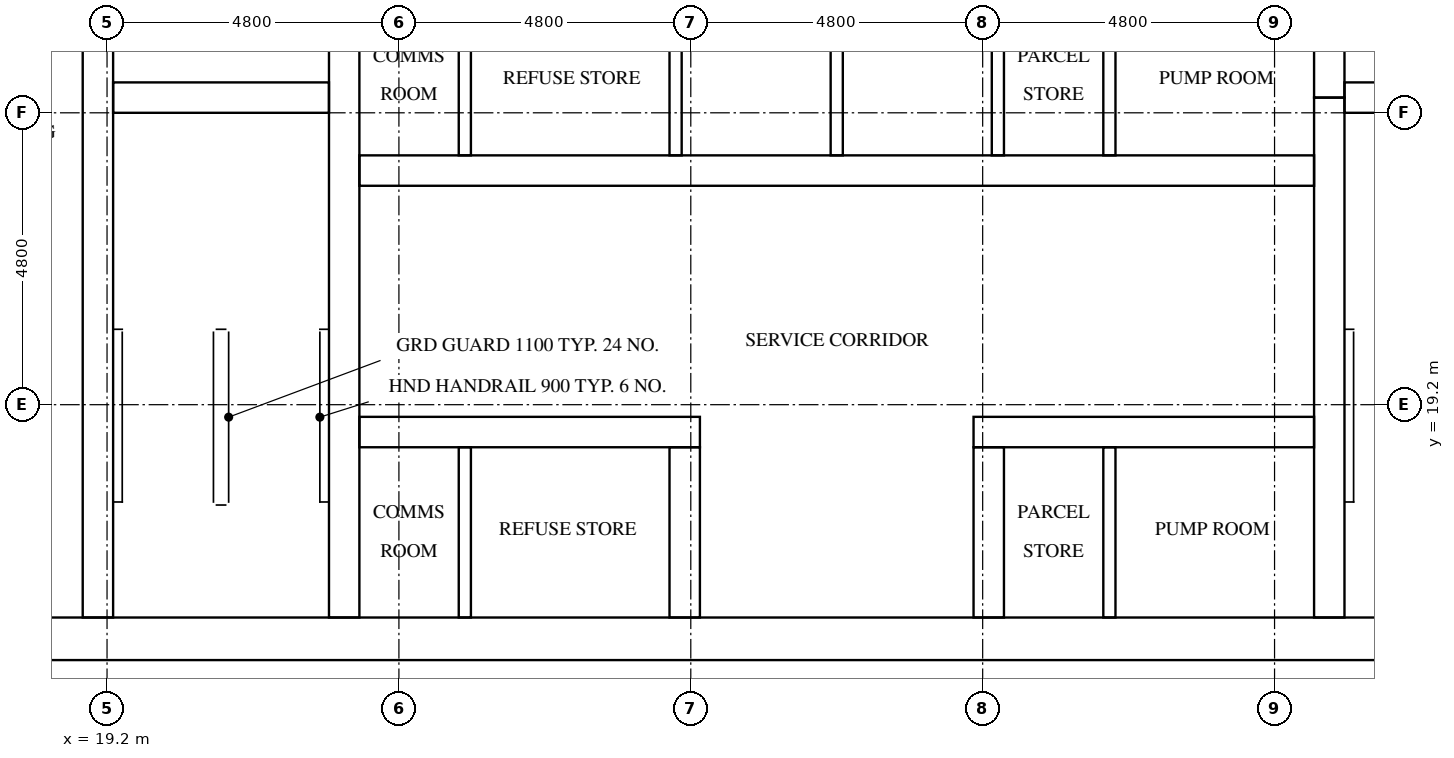
"""IFC4 building model, lengths in metres.
Left out: names, types, materials, properties, quantities, classifications, styles, units other than length and angle.
Written with IfcOpenShell. Run it as: python <this file> out.ifc"""

import sys

from ifc_helpers import new_model, si_unit, direction, frame, frame_2d, origin, place, context, subcontext, project, spatial, rectangle, extrude, element, fill, save


model = new_model("IFC4")
c1 = context("Model", 3, precision=1e-05, world=origin(), true_north=direction((0.0, 1.0)))
c2 = subcontext(c1, "Body", "Model", "MODEL_VIEW")
j1 = project(units=[si_unit("LENGTHUNIT", "METRE"), si_unit("PLANEANGLEUNIT", "RADIAN")], contexts=[c1])
p1 = place(None, origin())
s1 = spatial("IfcSite", under=j1, at=p1, CompositionType="ELEMENT")
p2 = place(p1, origin())
s2 = spatial("IfcBuilding", under=s1, at=p2, CompositionType="ELEMENT")
p3 = place(p2, frame((0.0, 0.0, 222.8)))
s3 = spatial("IfcBuildingStorey", under=s2, at=p3, CompositionType="ELEMENT", Elevation=222.8)
p4 = place(p3, frame((15.0, 15.35, 0.0), z_axis=(0.0, 0.0, 1.0), x_axis=(1.0, 0.0, 0.0)))
e1 = element("IfcWall", 1, at=p4, inside=s3, PredefinedType="SHEAR", context=c2, shape_type="SweptSolid", body=[
    extrude(rectangle(XDim=32.4, YDim=0.7, at=frame_2d((16.2, 0.0))), origin(), (0.0, 0.0, 1.0), 3.2),
])
p5 = place(p4, frame((15.3, 0.0, 0.0)))
e2 = element("IfcOpeningElement", 2, at=p5, cuts=e1, PredefinedType="OPENING", context=c2, shape_type="SweptSolid", body=[
    extrude(rectangle(XDim=1.8, YDim=2.1, at=frame_2d((0.9, 1.05))), frame((0.0, 0.36, 0.0), z_axis=(0.0, -1.0, 0.0), x_axis=(1.0, 0.0, 0.0)), (0.0, 0.0, 1.0), 0.72),
])
p6 = place(p3, frame((19.05, 15.7, 0.0), z_axis=(0.0, 0.0, 1.0), x_axis=(0.0, 1.0, 0.0)))
e3 = element("IfcWall", 3, at=p6, inside=s3, PredefinedType="SHEAR", context=c2, shape_type="SweptSolid", body=[
    extrude(rectangle(XDim=15.3, YDim=0.5, at=frame_2d((7.65, 0.0))), origin(), (0.0, 0.0, 1.0), 3.2),
])
p7 = place(p6, frame((9.75, 0.0, 0.0)))
e4 = element("IfcOpeningElement", 4, at=p7, cuts=e3, PredefinedType="OPENING", context=c2, shape_type="SweptSolid", body=[
    extrude(rectangle(XDim=1.1, YDim=2.1, at=frame_2d((0.55, 1.05))), frame((0.0, 0.26, 0.0), z_axis=(0.0, -1.0, 0.0), x_axis=(1.0, 0.0, 0.0)), (0.0, 0.0, 1.0), 0.52),
])
p8 = place(p6, frame((13.25, 0.0, 0.0)))
e5 = element("IfcOpeningElement", 5, at=p8, cuts=e3, PredefinedType="OPENING", context=c2, shape_type="SweptSolid", body=[
    extrude(rectangle(XDim=1.1, YDim=2.1, at=frame_2d((0.55, 1.05))), frame((0.0, 0.26, 0.0), z_axis=(0.0, -1.0, 0.0), x_axis=(1.0, 0.0, 0.0)), (0.0, 0.0, 1.0), 0.52),
])
p9 = place(p6, frame((0.5, 0.0, 0.0)))
e6 = element("IfcOpeningElement", 6, at=p9, cuts=e3, PredefinedType="OPENING", context=c2, shape_type="SweptSolid", body=[
    extrude(rectangle(XDim=1.2, YDim=2.1, at=frame_2d((0.6, 1.05))), frame((0.0, 0.26, 0.0), z_axis=(0.0, -1.0, 0.0), x_axis=(1.0, 0.0, 0.0)), (0.0, 0.0, 1.0), 0.52),
])
p10 = place(p3, frame((23.1, 15.7, 0.0), z_axis=(0.0, 0.0, 1.0), x_axis=(0.0, 1.0, 0.0)))
e7 = element("IfcWall", 7, at=p10, inside=s3, PredefinedType="SHEAR", context=c2, shape_type="SweptSolid", body=[
    extrude(rectangle(XDim=21.4, YDim=0.5, at=frame_2d((10.7, 0.0))), origin(), (0.0, 0.0, 1.0), 3.2),
])
p11 = place(p3, frame((39.3, 15.7, 0.0), z_axis=(0.0, 0.0, 1.0), x_axis=(0.0, 1.0, 0.0)))
e8 = element("IfcWall", 8, at=p11, inside=s3, PredefinedType="SHEAR", context=c2, shape_type="SweptSolid", body=[
    extrude(rectangle(XDim=8.55, YDim=0.5, at=frame_2d((4.275, 0.0))), origin(), (0.0, 0.0, 1.0), 3.2),
])
p12 = place(p3, frame((39.3, 24.25, 0.0), z_axis=(0.0, 0.0, 1.0), x_axis=(0.0, 1.0, 0.0)))
e9 = element("IfcWall", 9, at=p12, inside=s3, PredefinedType="SHEAR", context=c2, shape_type="SweptSolid", body=[
    extrude(rectangle(XDim=3.5, YDim=0.5, at=frame_2d((1.75, 0.0))), origin(), (0.0, 0.0, 1.0), 3.2),
])
for number, where, z_axis, x_axis in (
    (10, (19.3, 24.25, 0.0), (0.0, 0.0, 1.0), (1.0, 0.0, 0.0)),
    (11, (39.55, 24.25, 0.0), (0.0, 0.0, 1.0), (1.0, 0.0, 0.0)),
):
    element("IfcWall", number, at=place(p3, frame(where, z_axis=z_axis, x_axis=x_axis)), inside=s3, PredefinedType="SHEAR", context=c2, shape_type="SweptSolid", body=[
        extrude(rectangle(XDim=3.55, YDim=0.5, at=frame_2d((1.775, 0.0))), origin(), (0.0, 0.0, 1.0), 3.2),
    ])
p13 = place(p3, frame((23.35, 18.75, 0.0), z_axis=(0.0, 0.0, 1.0), x_axis=(1.0, 0.0, 0.0)))
e12 = element("IfcWall", 12, at=p13, inside=s3, PredefinedType="SHEAR", context=c2, shape_type="SweptSolid", body=[
    extrude(rectangle(XDim=5.6, YDim=0.5, at=frame_2d((2.8, 0.0))), origin(), (0.0, 0.0, 1.0), 3.2),
])
p14 = place(p13, frame((0.317, 0.0, 0.0)))
e13 = element("IfcOpeningElement", 13, at=p14, cuts=e12, PredefinedType="OPENING", context=c2, shape_type="SweptSolid", body=[
    extrude(rectangle(XDim=1.0, YDim=2.1, at=frame_2d((0.5, 1.05))), frame((0.0, 0.26, 0.0), z_axis=(0.0, -1.0, 0.0), x_axis=(1.0, 0.0, 0.0)), (0.0, 0.0, 1.0), 0.52),
])
p15 = place(p13, frame((2.967, 0.0, 0.0)))
e14 = element("IfcOpeningElement", 14, at=p15, cuts=e12, PredefinedType="OPENING", context=c2, shape_type="SweptSolid", body=[
    extrude(rectangle(XDim=1.0, YDim=2.1, at=frame_2d((0.5, 1.05))), frame((0.0, 0.26, 0.0), z_axis=(0.0, -1.0, 0.0), x_axis=(1.0, 0.0, 0.0)), (0.0, 0.0, 1.0), 0.52),
])
p16 = place(p3, frame((33.45, 18.75, 0.0), z_axis=(0.0, 0.0, 1.0), x_axis=(1.0, 0.0, 0.0)))
e15 = element("IfcWall", 15, at=p16, inside=s3, PredefinedType="SHEAR", context=c2, shape_type="SweptSolid", body=[
    extrude(rectangle(XDim=5.6, YDim=0.5, at=frame_2d((2.8, 0.0))), origin(), (0.0, 0.0, 1.0), 3.2),
])
p17 = place(p16, frame((0.817, 0.0, 0.0)))
e16 = element("IfcOpeningElement", 16, at=p17, cuts=e15, PredefinedType="OPENING", context=c2, shape_type="SweptSolid", body=[
    extrude(rectangle(XDim=1.0, YDim=2.1, at=frame_2d((0.5, 1.05))), frame((0.0, 0.26, 0.0), z_axis=(0.0, -1.0, 0.0), x_axis=(1.0, 0.0, 0.0)), (0.0, 0.0, 1.0), 0.52),
])
p18 = place(p16, frame((3.467, 0.0, 0.0)))
e17 = element("IfcOpeningElement", 17, at=p18, cuts=e15, PredefinedType="OPENING", context=c2, shape_type="SweptSolid", body=[
    extrude(rectangle(XDim=1.0, YDim=2.1, at=frame_2d((0.5, 1.05))), frame((0.0, 0.26, 0.0), z_axis=(0.0, -1.0, 0.0), x_axis=(1.0, 0.0, 0.0)), (0.0, 0.0, 1.0), 0.52),
])
p19 = place(p3, frame((23.35, 23.05, 0.0), z_axis=(0.0, 0.0, 1.0), x_axis=(1.0, 0.0, 0.0)))
e18 = element("IfcWall", 18, at=p19, inside=s3, PredefinedType="SHEAR", context=c2, shape_type="SweptSolid", body=[
    extrude(rectangle(XDim=15.7, YDim=0.5, at=frame_2d((7.85, 0.0))), origin(), (0.0, 0.0, 1.0), 3.2),
])
p20 = place(p19, frame((0.317, 0.0, 0.0)))
e19 = element("IfcOpeningElement", 19, at=p20, cuts=e18, PredefinedType="OPENING", context=c2, shape_type="SweptSolid", body=[
    extrude(rectangle(XDim=1.0, YDim=2.1, at=frame_2d((0.5, 1.05))), frame((0.0, 0.26, 0.0), z_axis=(0.0, -1.0, 0.0), x_axis=(1.0, 0.0, 0.0)), (0.0, 0.0, 1.0), 0.52),
])
p21 = place(p19, frame((2.967, 0.0, 0.0)))
e20 = element("IfcOpeningElement", 20, at=p21, cuts=e18, PredefinedType="OPENING", context=c2, shape_type="SweptSolid", body=[
    extrude(rectangle(XDim=1.0, YDim=2.1, at=frame_2d((0.5, 1.05))), frame((0.0, 0.26, 0.0), z_axis=(0.0, -1.0, 0.0), x_axis=(1.0, 0.0, 0.0)), (0.0, 0.0, 1.0), 0.52),
])
p22 = place(p19, frame((10.917, 0.0, 0.0)))
e21 = element("IfcOpeningElement", 21, at=p22, cuts=e18, PredefinedType="OPENING", context=c2, shape_type="SweptSolid", body=[
    extrude(rectangle(XDim=1.0, YDim=2.1, at=frame_2d((0.5, 1.05))), frame((0.0, 0.26, 0.0), z_axis=(0.0, -1.0, 0.0), x_axis=(1.0, 0.0, 0.0)), (0.0, 0.0, 1.0), 0.52),
])
p23 = place(p19, frame((13.567, 0.0, 0.0)))
e22 = element("IfcOpeningElement", 22, at=p23, cuts=e18, PredefinedType="OPENING", context=c2, shape_type="SweptSolid", body=[
    extrude(rectangle(XDim=1.0, YDim=2.1, at=frame_2d((0.5, 1.05))), frame((0.0, 0.26, 0.0), z_axis=(0.0, -1.0, 0.0), x_axis=(1.0, 0.0, 0.0)), (0.0, 0.0, 1.0), 0.52),
])
for number, where, z_axis, x_axis in (
    (23, (28.7, 15.7, 0.0), (0.0, 0.0, 1.0), (0.0, 1.0, 0.0)),
    (24, (33.7, 15.7, 0.0), (0.0, 0.0, 1.0), (0.0, 1.0, 0.0)),
):
    element("IfcWall", number, at=place(p3, frame(where, z_axis=z_axis, x_axis=x_axis)), inside=s3, PredefinedType="SHEAR", context=c2, shape_type="SweptSolid", body=[
        extrude(rectangle(XDim=2.8, YDim=0.5, at=frame_2d((1.4, 0.0))), origin(), (0.0, 0.0, 1.0), 3.2),
    ])
for number, where, z_axis, x_axis in (
    (25, (28.55, 23.3, 0.0), (0.0, 0.0, 1.0), (0.0, 1.0, 0.0)),
    (26, (31.2, 23.3, 0.0), (0.0, 0.0, 1.0), (0.0, 1.0, 0.0)),
    (27, (33.85, 23.3, 0.0), (0.0, 0.0, 1.0), (0.0, 1.0, 0.0)),
):
    element("IfcWall", number, at=place(p3, frame(where, z_axis=z_axis, x_axis=x_axis)), inside=s3, PredefinedType="SOLIDWALL", context=c2, shape_type="SweptSolid", body=[
        extrude(rectangle(XDim=2.6, YDim=0.2, at=frame_2d((1.3, 0.0))), origin(), (0.0, 0.0, 1.0), 3.2),
    ])
for number, where, z_axis, x_axis in (
    (28, (25.084, 23.3, 0.0), (0.0, 0.0, 1.0), (0.0, 1.0, 0.0)),
    (29, (35.684, 23.3, 0.0), (0.0, 0.0, 1.0), (0.0, 1.0, 0.0)),
):
    element("IfcWall", number, at=place(p3, frame(where, z_axis=z_axis, x_axis=x_axis)), inside=s3, PredefinedType="PARTITIONING", context=c2, shape_type="SweptSolid", body=[
        extrude(rectangle(XDim=2.6, YDim=0.2, at=frame_2d((1.3, 0.0))), origin(), (0.0, 0.0, 1.0), 3.2),
    ])
for number, where, z_axis, x_axis in (
    (30, (25.084, 15.7, 0.0), (0.0, 0.0, 1.0), (0.0, 1.0, 0.0)),
    (31, (35.684, 15.7, 0.0), (0.0, 0.0, 1.0), (0.0, 1.0, 0.0)),
):
    element("IfcWall", number, at=place(p3, frame(where, z_axis=z_axis, x_axis=x_axis)), inside=s3, PredefinedType="PARTITIONING", context=c2, shape_type="SweptSolid", body=[
        extrude(rectangle(XDim=2.8, YDim=0.2, at=frame_2d((1.4, 0.0))), origin(), (0.0, 0.0, 1.0), 3.2),
    ])
p24 = place(p9, frame((1.2, 0.0, 0.0), z_axis=(0.0, 0.0, 1.0), x_axis=(-1.0, 0.0, 0.0)))
e32 = element("IfcDoor", 32, at=p24, inside=s3, OperationType="SINGLE_SWING_RIGHT", PredefinedType="DOOR", context=c2, shape_type="SweptSolid", body=[
    extrude(rectangle(XDim=1.2, YDim=2.1, at=frame_2d((0.6, 1.05))), frame((0.0, 0.025, 0.0), z_axis=(0.0, -1.0, 0.0), x_axis=(1.0, 0.0, 0.0)), (0.0, 0.0, 1.0), 0.05),
])
fill(e6, e32)
p25 = place(p5, frame((1.8, 0.0, 0.0), z_axis=(0.0, 0.0, 1.0), x_axis=(-1.0, 0.0, 0.0)))
e33 = element("IfcDoor", 33, at=p25, inside=s3, OperationType="DOUBLE_DOOR_SINGLE_SWING", PredefinedType="DOOR", context=c2, shape_type="SweptSolid", body=[
    extrude(rectangle(XDim=1.8, YDim=2.1, at=frame_2d((0.9, 1.05))), frame((0.0, 0.025, 0.0), z_axis=(0.0, -1.0, 0.0), x_axis=(1.0, 0.0, 0.0)), (0.0, 0.0, 1.0), 0.05),
])
fill(e2, e33)
p26 = place(p20, frame((1.0, 0.0, 0.0), z_axis=(0.0, 0.0, 1.0), x_axis=(-1.0, 0.0, 0.0)))
e34 = element("IfcDoor", 34, at=p26, inside=s3, OperationType="SINGLE_SWING_LEFT", PredefinedType="DOOR", context=c2, shape_type="SweptSolid", body=[
    extrude(rectangle(XDim=1.0, YDim=2.1, at=frame_2d((0.5, 1.05))), frame((0.0, 0.025, 0.0), z_axis=(0.0, -1.0, 0.0), x_axis=(1.0, 0.0, 0.0)), (0.0, 0.0, 1.0), 0.05),
])
fill(e19, e34)
p27 = place(p21, frame((1.0, 0.0, 0.0), z_axis=(0.0, 0.0, 1.0), x_axis=(-1.0, 0.0, 0.0)))
e35 = element("IfcDoor", 35, at=p27, inside=s3, OperationType="SINGLE_SWING_RIGHT", PredefinedType="DOOR", context=c2, shape_type="SweptSolid", body=[
    extrude(rectangle(XDim=1.0, YDim=2.1, at=frame_2d((0.5, 1.05))), frame((0.0, 0.025, 0.0), z_axis=(0.0, -1.0, 0.0), x_axis=(1.0, 0.0, 0.0)), (0.0, 0.0, 1.0), 0.05),
])
fill(e20, e35)
p28 = place(p22, frame((1.0, 0.0, 0.0), z_axis=(0.0, 0.0, 1.0), x_axis=(-1.0, 0.0, 0.0)))
e36 = element("IfcDoor", 36, at=p28, inside=s3, OperationType="SINGLE_SWING_LEFT", PredefinedType="DOOR", context=c2, shape_type="SweptSolid", body=[
    extrude(rectangle(XDim=1.0, YDim=2.1, at=frame_2d((0.5, 1.05))), frame((0.0, 0.025, 0.0), z_axis=(0.0, -1.0, 0.0), x_axis=(1.0, 0.0, 0.0)), (0.0, 0.0, 1.0), 0.05),
])
fill(e21, e36)
p29 = place(p23, frame((1.0, 0.0, 0.0), z_axis=(0.0, 0.0, 1.0), x_axis=(-1.0, 0.0, 0.0)))
e37 = element("IfcDoor", 37, at=p29, inside=s3, OperationType="SINGLE_SWING_RIGHT", PredefinedType="DOOR", context=c2, shape_type="SweptSolid", body=[
    extrude(rectangle(XDim=1.0, YDim=2.1, at=frame_2d((0.5, 1.05))), frame((0.0, 0.025, 0.0), z_axis=(0.0, -1.0, 0.0), x_axis=(1.0, 0.0, 0.0)), (0.0, 0.0, 1.0), 0.05),
])
fill(e22, e37)
p30 = place(p14, origin())
e38 = element("IfcDoor", 38, at=p30, inside=s3, OperationType="SINGLE_SWING_LEFT", PredefinedType="DOOR", context=c2, shape_type="SweptSolid", body=[
    extrude(rectangle(XDim=1.0, YDim=2.1, at=frame_2d((0.5, 1.05))), frame((0.0, 0.025, 0.0), z_axis=(0.0, -1.0, 0.0), x_axis=(1.0, 0.0, 0.0)), (0.0, 0.0, 1.0), 0.05),
])
fill(e13, e38)
p31 = place(p15, origin())
e39 = element("IfcDoor", 39, at=p31, inside=s3, OperationType="SINGLE_SWING_RIGHT", PredefinedType="DOOR", context=c2, shape_type="SweptSolid", body=[
    extrude(rectangle(XDim=1.0, YDim=2.1, at=frame_2d((0.5, 1.05))), frame((0.0, 0.025, 0.0), z_axis=(0.0, -1.0, 0.0), x_axis=(1.0, 0.0, 0.0)), (0.0, 0.0, 1.0), 0.05),
])
fill(e14, e39)
p32 = place(p17, origin())
e40 = element("IfcDoor", 40, at=p32, inside=s3, OperationType="SINGLE_SWING_LEFT", PredefinedType="DOOR", context=c2, shape_type="SweptSolid", body=[
    extrude(rectangle(XDim=1.0, YDim=2.1, at=frame_2d((0.5, 1.05))), frame((0.0, 0.025, 0.0), z_axis=(0.0, -1.0, 0.0), x_axis=(1.0, 0.0, 0.0)), (0.0, 0.0, 1.0), 0.05),
])
fill(e16, e40)
p33 = place(p18, origin())
e41 = element("IfcDoor", 41, at=p33, inside=s3, OperationType="SINGLE_SWING_RIGHT", PredefinedType="DOOR", context=c2, shape_type="SweptSolid", body=[
    extrude(rectangle(XDim=1.0, YDim=2.1, at=frame_2d((0.5, 1.05))), frame((0.0, 0.025, 0.0), z_axis=(0.0, -1.0, 0.0), x_axis=(1.0, 0.0, 0.0)), (0.0, 0.0, 1.0), 0.05),
])
fill(e17, e41)
save(model, sys.argv[1])
